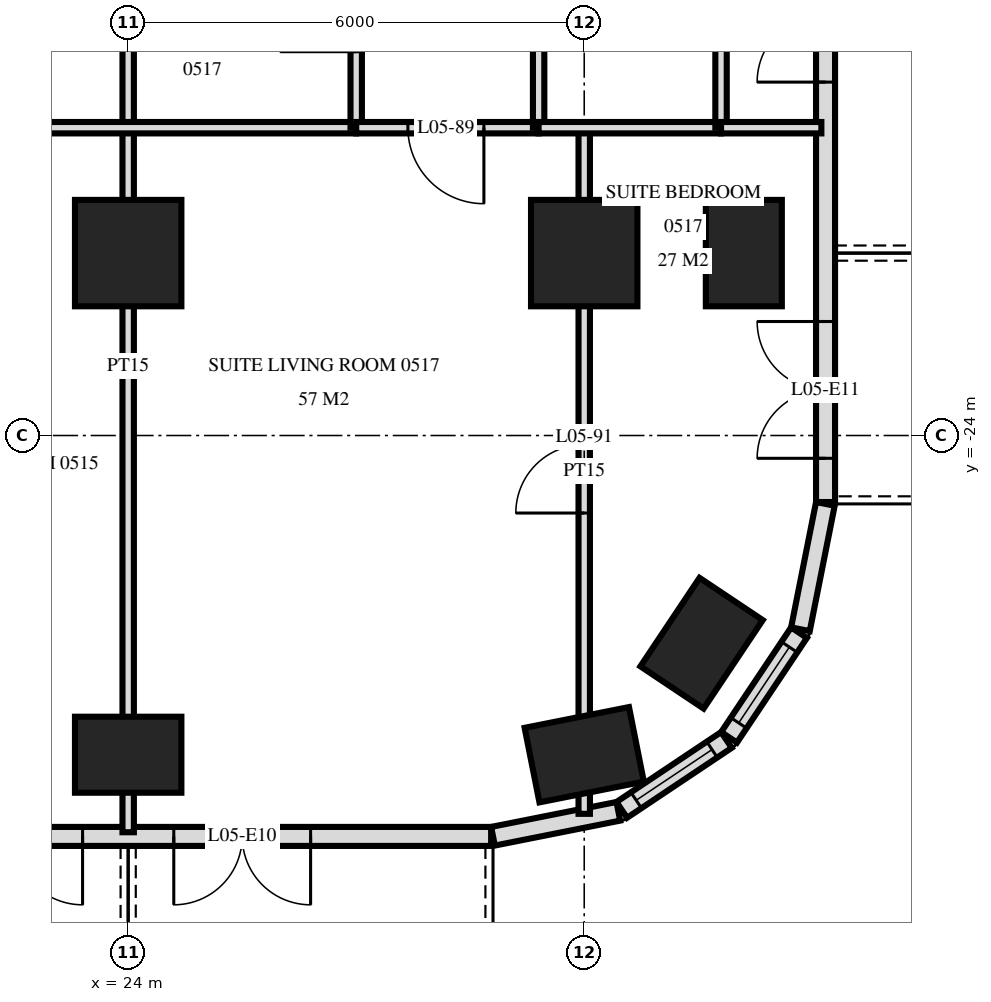
"""IFC4 building model, lengths in metres.
Left out: names, types, materials, properties, quantities, classifications, styles, units other than length and angle.
Written with IfcOpenShell. Run it as: python <this file> out.ifc"""

import sys

from ifc_helpers import new_model, si_unit, direction, frame, frame_2d, origin, origin_2d, place, context, subcontext, project, spatial, rectangle, extrude, element, fill, save


model = new_model("IFC4")
c1 = context("Model", 3, precision=1e-05, world=origin(), true_north=direction((0.0, 1.0)))
c2 = subcontext(c1, "Body", "Model", "MODEL_VIEW")
j1 = project(units=[si_unit("LENGTHUNIT", "METRE"), si_unit("PLANEANGLEUNIT", "RADIAN")], contexts=[c1])
p1 = place(None, origin())
s1 = spatial("IfcSite", under=j1, at=p1, CompositionType="ELEMENT")
p2 = place(p1, origin())
s2 = spatial("IfcBuilding", under=s1, at=p2, CompositionType="ELEMENT")
p3 = place(p2, frame((0.0, 0.0, 27.6)))
s3 = spatial("IfcBuildingStorey", under=s2, at=p3, CompositionType="ELEMENT", Elevation=27.6)
p4 = place(p3, frame((24.0, -28.2, 0.0), z_axis=(0.0, 0.0, 1.0), x_axis=(1.0, 0.0, 0.0)))
e1 = element("IfcColumn", 1, at=p4, inside=s3, PredefinedType="COLUMN", context=c2, shape_type="SweptSolid", body=[
    extrude(rectangle(XDim=1.4, YDim=1.0, at=origin_2d()), origin(), (0.0, 0.0, 1.0), 3.6),
])
p5 = place(p3, frame((24.0, -21.6, 0.0), z_axis=(0.0, 0.0, 1.0), x_axis=(1.0, 0.0, 0.0)))
e2 = element("IfcColumn", 2, at=p5, inside=s3, PredefinedType="COLUMN", context=c2, shape_type="SweptSolid", body=[
    extrude(rectangle(XDim=1.4, YDim=1.4, at=origin_2d()), origin(), (0.0, 0.0, 1.0), 3.6),
])
p6 = place(p3, frame((30.0, -28.2, 0.0), z_axis=(0.0, 0.0, 1.0), x_axis=(0.980792089743, 0.195056086032, 0.0)))
e3 = element("IfcColumn", 3, at=p6, inside=s3, PredefinedType="COLUMN", context=c2, shape_type="SweptSolid", body=[
    extrude(rectangle(XDim=1.4, YDim=1.0, at=origin_2d()), origin(), (0.0, 0.0, 1.0), 3.6),
])
p7 = place(p3, frame((30.0, -21.6, 0.0), z_axis=(0.0, 0.0, 1.0), x_axis=(1.0, 0.0, 0.0)))
e4 = element("IfcColumn", 4, at=p7, inside=s3, PredefinedType="COLUMN", context=c2, shape_type="SweptSolid", body=[
    extrude(rectangle(XDim=1.4, YDim=1.4, at=origin_2d()), origin(), (0.0, 0.0, 1.0), 3.6),
])
for number, where, z_axis, x_axis in (
    (5, (31.544, -26.733, 0.0), (0.0, 0.0, 1.0), (0.556, 0.831, 0.0)),
    (6, (32.1, -21.6, 0.0), (0.0, 0.0, 1.0), (0.0, 1.0, 0.0)),
):
    element("IfcColumn", number, at=place(p3, frame(where, z_axis=z_axis, x_axis=x_axis)), inside=s3, PredefinedType="COLUMN", context=c2, shape_type="SweptSolid", body=[
        extrude(rectangle(XDim=1.4, YDim=1.0, at=origin_2d()), origin(), (0.0, 0.0, 1.0), 3.6),
    ])
p8 = place(p3, frame((-28.775, -29.275, 0.0), z_axis=(0.0, 0.0, 1.0), x_axis=(1.0, 0.0, 0.0)))
e7 = element("IfcWall", 7, at=p8, inside=s3, PredefinedType="SOLIDWALL", context=c2, shape_type="SweptSolid", body=[
    extrude(rectangle(XDim=57.551, YDim=0.25, at=frame_2d((28.775, 0.0))), origin(), (0.0, 0.0, 1.0), 3.32),
])
p9 = place(p8, frame((0.575, 0.0, 0.0)))
e8 = element("IfcOpeningElement", 8, at=p9, cuts=e7, PredefinedType="OPENING", context=c2, shape_type="SweptSolid", body=[
    extrude(rectangle(XDim=1.8, YDim=2.4, at=frame_2d((0.9, 1.2))), frame((0.0, 0.135, 0.0), z_axis=(0.0, -1.0, 0.0), x_axis=(1.0, 0.0, 0.0)), (0.0, 0.0, 1.0), 0.27),
])
p10 = place(p8, frame((5.375, 0.0, 0.0)))
e9 = element("IfcOpeningElement", 9, at=p10, cuts=e7, PredefinedType="OPENING", context=c2, shape_type="SweptSolid", body=[
    extrude(rectangle(XDim=1.8, YDim=2.4, at=frame_2d((0.9, 1.2))), frame((0.0, 0.135, 0.0), z_axis=(0.0, -1.0, 0.0), x_axis=(1.0, 0.0, 0.0)), (0.0, 0.0, 1.0), 0.27),
])
p11 = place(p8, frame((8.075, 0.0, 0.3)))
e10 = element("IfcOpeningElement", 10, at=p11, cuts=e7, PredefinedType="OPENING", context=c2, shape_type="SweptSolid", body=[
    extrude(rectangle(XDim=2.4, YDim=2.1, at=frame_2d((1.2, 1.05))), frame((0.0, 0.135, 0.0), z_axis=(0.0, -1.0, 0.0), x_axis=(1.0, 0.0, 0.0)), (0.0, 0.0, 1.0), 0.27),
])
p12 = place(p8, frame((11.375, 0.0, 0.0)))
e11 = element("IfcOpeningElement", 11, at=p12, cuts=e7, PredefinedType="OPENING", context=c2, shape_type="SweptSolid", body=[
    extrude(rectangle(XDim=1.8, YDim=2.4, at=frame_2d((0.9, 1.2))), frame((0.0, 0.135, 0.0), z_axis=(0.0, -1.0, 0.0), x_axis=(1.0, 0.0, 0.0)), (0.0, 0.0, 1.0), 0.27),
])
p13 = place(p8, frame((14.075, 0.0, 0.3)))
e12 = element("IfcOpeningElement", 12, at=p13, cuts=e7, PredefinedType="OPENING", context=c2, shape_type="SweptSolid", body=[
    extrude(rectangle(XDim=2.4, YDim=2.1, at=frame_2d((1.2, 1.05))), frame((0.0, 0.135, 0.0), z_axis=(0.0, -1.0, 0.0), x_axis=(1.0, 0.0, 0.0)), (0.0, 0.0, 1.0), 0.27),
])
p14 = place(p8, frame((17.375, 0.0, 0.0)))
e13 = element("IfcOpeningElement", 13, at=p14, cuts=e7, PredefinedType="OPENING", context=c2, shape_type="SweptSolid", body=[
    extrude(rectangle(XDim=1.8, YDim=2.4, at=frame_2d((0.9, 1.2))), frame((0.0, 0.135, 0.0), z_axis=(0.0, -1.0, 0.0), x_axis=(1.0, 0.0, 0.0)), (0.0, 0.0, 1.0), 0.27),
])
p15 = place(p8, frame((20.075, 0.0, 0.3)))
e14 = element("IfcOpeningElement", 14, at=p15, cuts=e7, PredefinedType="OPENING", context=c2, shape_type="SweptSolid", body=[
    extrude(rectangle(XDim=2.4, YDim=2.1, at=frame_2d((1.2, 1.05))), frame((0.0, 0.135, 0.0), z_axis=(0.0, -1.0, 0.0), x_axis=(1.0, 0.0, 0.0)), (0.0, 0.0, 1.0), 0.27),
])
p16 = place(p8, frame((23.075, 0.0, 0.3)))
e15 = element("IfcOpeningElement", 15, at=p16, cuts=e7, PredefinedType="OPENING", context=c2, shape_type="SweptSolid", body=[
    extrude(rectangle(XDim=2.4, YDim=2.1, at=frame_2d((1.2, 1.05))), frame((0.0, 0.135, 0.0), z_axis=(0.0, -1.0, 0.0), x_axis=(1.0, 0.0, 0.0)), (0.0, 0.0, 1.0), 0.27),
])
p17 = place(p8, frame((26.375, 0.0, 0.0)))
e16 = element("IfcOpeningElement", 16, at=p17, cuts=e7, PredefinedType="OPENING", context=c2, shape_type="SweptSolid", body=[
    extrude(rectangle(XDim=1.8, YDim=2.4, at=frame_2d((0.9, 1.2))), frame((0.0, 0.135, 0.0), z_axis=(0.0, -1.0, 0.0), x_axis=(1.0, 0.0, 0.0)), (0.0, 0.0, 1.0), 0.27),
])
p18 = place(p8, frame((29.375, 0.0, 0.0)))
e17 = element("IfcOpeningElement", 17, at=p18, cuts=e7, PredefinedType="OPENING", context=c2, shape_type="SweptSolid", body=[
    extrude(rectangle(XDim=1.8, YDim=2.4, at=frame_2d((0.9, 1.2))), frame((0.0, 0.135, 0.0), z_axis=(0.0, -1.0, 0.0), x_axis=(1.0, 0.0, 0.0)), (0.0, 0.0, 1.0), 0.27),
])
p19 = place(p8, frame((32.075, 0.0, 0.3)))
e18 = element("IfcOpeningElement", 18, at=p19, cuts=e7, PredefinedType="OPENING", context=c2, shape_type="SweptSolid", body=[
    extrude(rectangle(XDim=2.4, YDim=2.1, at=frame_2d((1.2, 1.05))), frame((0.0, 0.135, 0.0), z_axis=(0.0, -1.0, 0.0), x_axis=(1.0, 0.0, 0.0)), (0.0, 0.0, 1.0), 0.27),
])
p20 = place(p8, frame((35.375, 0.0, 0.0)))
e19 = element("IfcOpeningElement", 19, at=p20, cuts=e7, PredefinedType="OPENING", context=c2, shape_type="SweptSolid", body=[
    extrude(rectangle(XDim=1.8, YDim=2.4, at=frame_2d((0.9, 1.2))), frame((0.0, 0.135, 0.0), z_axis=(0.0, -1.0, 0.0), x_axis=(1.0, 0.0, 0.0)), (0.0, 0.0, 1.0), 0.27),
])
p21 = place(p8, frame((38.075, 0.0, 0.3)))
e20 = element("IfcOpeningElement", 20, at=p21, cuts=e7, PredefinedType="OPENING", context=c2, shape_type="SweptSolid", body=[
    extrude(rectangle(XDim=2.4, YDim=2.1, at=frame_2d((1.2, 1.05))), frame((0.0, 0.135, 0.0), z_axis=(0.0, -1.0, 0.0), x_axis=(1.0, 0.0, 0.0)), (0.0, 0.0, 1.0), 0.27),
])
p22 = place(p8, frame((41.375, 0.0, 0.0)))
e21 = element("IfcOpeningElement", 21, at=p22, cuts=e7, PredefinedType="OPENING", context=c2, shape_type="SweptSolid", body=[
    extrude(rectangle(XDim=1.8, YDim=2.4, at=frame_2d((0.9, 1.2))), frame((0.0, 0.135, 0.0), z_axis=(0.0, -1.0, 0.0), x_axis=(1.0, 0.0, 0.0)), (0.0, 0.0, 1.0), 0.27),
])
p23 = place(p8, frame((44.075, 0.0, 0.3)))
e22 = element("IfcOpeningElement", 22, at=p23, cuts=e7, PredefinedType="OPENING", context=c2, shape_type="SweptSolid", body=[
    extrude(rectangle(XDim=2.4, YDim=2.1, at=frame_2d((1.2, 1.05))), frame((0.0, 0.135, 0.0), z_axis=(0.0, -1.0, 0.0), x_axis=(1.0, 0.0, 0.0)), (0.0, 0.0, 1.0), 0.27),
])
p24 = place(p8, frame((47.075, 0.0, 0.3)))
e23 = element("IfcOpeningElement", 23, at=p24, cuts=e7, PredefinedType="OPENING", context=c2, shape_type="SweptSolid", body=[
    extrude(rectangle(XDim=2.4, YDim=2.1, at=frame_2d((1.2, 1.05))), frame((0.0, 0.135, 0.0), z_axis=(0.0, -1.0, 0.0), x_axis=(1.0, 0.0, 0.0)), (0.0, 0.0, 1.0), 0.27),
])
p25 = place(p8, frame((50.375, 0.0, 0.0)))
e24 = element("IfcOpeningElement", 24, at=p25, cuts=e7, PredefinedType="OPENING", context=c2, shape_type="SweptSolid", body=[
    extrude(rectangle(XDim=1.8, YDim=2.4, at=frame_2d((0.9, 1.2))), frame((0.0, 0.135, 0.0), z_axis=(0.0, -1.0, 0.0), x_axis=(1.0, 0.0, 0.0)), (0.0, 0.0, 1.0), 0.27),
])
p26 = place(p8, frame((53.375, 0.0, 0.0)))
e25 = element("IfcOpeningElement", 25, at=p26, cuts=e7, PredefinedType="OPENING", context=c2, shape_type="SweptSolid", body=[
    extrude(rectangle(XDim=1.8, YDim=2.4, at=frame_2d((0.9, 1.2))), frame((0.0, 0.135, 0.0), z_axis=(0.0, -1.0, 0.0), x_axis=(1.0, 0.0, 0.0)), (0.0, 0.0, 1.0), 0.27),
])
p27 = place(p3, frame((28.8, -29.273, 0.0), z_axis=(0.0, 0.0, 1.0), x_axis=(0.980775640221, 0.19513878023, 0.0)))
e26 = element("IfcWall", 26, at=p27, inside=s3, PredefinedType="SOLIDWALL", context=c2, shape_type="SweptSolid", body=[
    extrude(rectangle(XDim=1.681, YDim=0.25, at=frame_2d((0.841, 0.0))), origin(), (0.0, 0.0, 1.0), 3.32),
])
p28 = place(p3, frame((30.494, -28.926, 0.0), z_axis=(0.0, 0.0, 1.0), x_axis=(0.831482937015, 0.55555029066, 0.0)))
e27 = element("IfcWall", 27, at=p28, inside=s3, PredefinedType="SOLIDWALL", context=c2, shape_type="SweptSolid", body=[
    extrude(rectangle(XDim=1.656, YDim=0.25, at=frame_2d((0.828, 0.0))), origin(), (0.0, 0.0, 1.0), 3.32),
])
p29 = place(p28, frame((0.228, 0.0, 0.9)))
e28 = element("IfcOpeningElement", 28, at=p29, cuts=e27, PredefinedType="OPENING", context=c2, shape_type="SweptSolid", body=[
    extrude(rectangle(XDim=1.2, YDim=1.5, at=frame_2d((0.6, 0.75))), frame((0.0, 0.135, 0.0), z_axis=(0.0, -1.0, 0.0), x_axis=(1.0, 0.0, 0.0)), (0.0, 0.0, 1.0), 0.27),
])
p30 = place(p3, frame((31.906, -27.971, 0.0), z_axis=(0.0, 0.0, 1.0), x_axis=(0.55555029066, 0.831482937015, 0.0)))
e29 = element("IfcWall", 29, at=p30, inside=s3, PredefinedType="SOLIDWALL", context=c2, shape_type="SweptSolid", body=[
    extrude(rectangle(XDim=1.656, YDim=0.25, at=frame_2d((0.828, 0.0))), origin(), (0.0, 0.0, 1.0), 3.32),
])
p31 = place(p30, frame((0.228, 0.0, 0.9)))
e30 = element("IfcOpeningElement", 30, at=p31, cuts=e29, PredefinedType="OPENING", context=c2, shape_type="SweptSolid", body=[
    extrude(rectangle(XDim=1.2, YDim=1.5, at=frame_2d((0.6, 0.75))), frame((0.0, 0.135, 0.0), z_axis=(0.0, -1.0, 0.0), x_axis=(1.0, 0.0, 0.0)), (0.0, 0.0, 1.0), 0.27),
])
p32 = place(p3, frame((32.844, -26.549, 0.0), z_axis=(0.0, 0.0, 1.0), x_axis=(0.195166572128, 0.980770110232, 0.0)))
e31 = element("IfcWall", 31, at=p32, inside=s3, PredefinedType="SOLIDWALL", context=c2, shape_type="SweptSolid", body=[
    extrude(rectangle(XDim=1.681, YDim=0.25, at=frame_2d((0.841, 0.0))), origin(), (0.0, 0.0, 1.0), 3.32),
])
p33 = place(p3, frame((33.175, -24.875, 0.0), z_axis=(0.0, 0.0, 1.0), x_axis=(0.0, 1.0, 0.0)))
e32 = element("IfcWall", 32, at=p33, inside=s3, PredefinedType="SOLIDWALL", context=c2, shape_type="SweptSolid", body=[
    extrude(rectangle(XDim=21.551, YDim=0.25, at=frame_2d((10.775, 0.0))), origin(), (0.0, 0.0, 1.0), 3.32),
])
p34 = place(p33, frame((0.575, 0.0, 0.0)))
e33 = element("IfcOpeningElement", 33, at=p34, cuts=e32, PredefinedType="OPENING", context=c2, shape_type="SweptSolid", body=[
    extrude(rectangle(XDim=1.8, YDim=2.4, at=frame_2d((0.9, 1.2))), frame((0.0, 0.135, 0.0), z_axis=(0.0, -1.0, 0.0), x_axis=(1.0, 0.0, 0.0)), (0.0, 0.0, 1.0), 0.27),
])
p35 = place(p33, frame((5.525, 0.0, 0.0)))
e34 = element("IfcOpeningElement", 34, at=p35, cuts=e32, PredefinedType="OPENING", context=c2, shape_type="SweptSolid", body=[
    extrude(rectangle(XDim=1.8, YDim=2.4, at=frame_2d((0.9, 1.2))), frame((0.0, 0.135, 0.0), z_axis=(0.0, -1.0, 0.0), x_axis=(1.0, 0.0, 0.0)), (0.0, 0.0, 1.0), 0.27),
])
p36 = place(p33, frame((12.725, 0.0, 0.0)))
e35 = element("IfcOpeningElement", 35, at=p36, cuts=e32, PredefinedType="OPENING", context=c2, shape_type="SweptSolid", body=[
    extrude(rectangle(XDim=1.8, YDim=2.4, at=frame_2d((0.9, 1.2))), frame((0.0, 0.135, 0.0), z_axis=(0.0, -1.0, 0.0), x_axis=(1.0, 0.0, 0.0)), (0.0, 0.0, 1.0), 0.27),
])
p37 = place(p3, frame((31.8, -19.95, 0.0), z_axis=(0.0, 0.0, 1.0), x_axis=(0.0, 1.0, 0.0)))
e36 = element("IfcWall", 36, at=p37, inside=s3, PredefinedType="PLUMBINGWALL", context=c2, shape_type="SweptSolid", body=[
    extrude(rectangle(XDim=3.0, YDim=0.15, at=frame_2d((1.5, 0.0))), origin(), (0.0, 0.0, 1.0), 3.32),
])
p38 = place(p37, frame((1.12, 0.0, 0.0)))
e37 = element("IfcOpeningElement", 37, at=p38, cuts=e36, PredefinedType="OPENING", context=c2, shape_type="SweptSolid", body=[
    extrude(rectangle(XDim=0.8, YDim=2.1, at=frame_2d((0.4, 1.05))), frame((0.0, 0.085, 0.0), z_axis=(0.0, -1.0, 0.0), x_axis=(1.0, 0.0, 0.0)), (0.0, 0.0, 1.0), 0.17),
])
p39 = place(p3, frame((30.0, -28.978, 0.0), z_axis=(0.0, 0.0, 1.0), x_axis=(0.0, 1.0, 0.0)))
e38 = element("IfcWall", 38, at=p39, inside=s3, PredefinedType="PARTITIONING", context=c2, shape_type="SweptSolid", body=[
    extrude(rectangle(XDim=9.028, YDim=0.15, at=frame_2d((4.514, 0.0))), origin(), (0.0, 0.0, 1.0), 3.32),
])
p40 = place(p39, frame((3.958, 0.0, 0.0)))
e39 = element("IfcOpeningElement", 39, at=p40, cuts=e38, PredefinedType="OPENING", context=c2, shape_type="SweptSolid", body=[
    extrude(rectangle(XDim=0.9, YDim=2.1, at=frame_2d((0.45, 1.05))), frame((0.0, 0.085, 0.0), z_axis=(0.0, -1.0, 0.0), x_axis=(1.0, 0.0, 0.0)), (0.0, 0.0, 1.0), 0.17),
])
p41 = place(p3, frame((29.4, -19.95, 0.0), z_axis=(0.0, 0.0, 1.0), x_axis=(0.0, 1.0, 0.0)))
e40 = element("IfcWall", 40, at=p41, inside=s3, PredefinedType="PARTITIONING", context=c2, shape_type="SweptSolid", body=[
    extrude(rectangle(XDim=3.0, YDim=0.15, at=frame_2d((1.5, 0.0))), origin(), (0.0, 0.0, 1.0), 3.32),
])
p42 = place(p41, frame((1.02, 0.0, 0.0)))
e41 = element("IfcOpeningElement", 41, at=p42, cuts=e40, PredefinedType="OPENING", context=c2, shape_type="SweptSolid", body=[
    extrude(rectangle(XDim=1.0, YDim=2.1, at=frame_2d((0.5, 1.05))), frame((0.0, 0.085, 0.0), z_axis=(0.0, -1.0, 0.0), x_axis=(1.0, 0.0, 0.0)), (0.0, 0.0, 1.0), 0.17),
])
p43 = place(p3, frame((27.0, -19.95, 0.0), z_axis=(0.0, 0.0, 1.0), x_axis=(0.0, 1.0, 0.0)))
e42 = element("IfcWall", 42, at=p43, inside=s3, PredefinedType="PARTITIONING", context=c2, shape_type="SweptSolid", body=[
    extrude(rectangle(XDim=3.0, YDim=0.15, at=frame_2d((1.5, 0.0))), origin(), (0.0, 0.0, 1.0), 3.32),
])
p44 = place(p43, frame((1.0, 0.0, 0.0)))
e43 = element("IfcOpeningElement", 43, at=p44, cuts=e42, PredefinedType="OPENING", context=c2, shape_type="SweptSolid", body=[
    extrude(rectangle(XDim=1.0, YDim=2.1, at=frame_2d((0.5, 1.05))), frame((0.0, 0.085, 0.0), z_axis=(0.0, -1.0, 0.0), x_axis=(1.0, 0.0, 0.0)), (0.0, 0.0, 1.0), 0.17),
])
p45 = place(p3, frame((24.0, -29.22, 0.0), z_axis=(0.0, 0.0, 1.0), x_axis=(0.0, 1.0, 0.0)))
e44 = element("IfcWall", 44, at=p45, inside=s3, PredefinedType="PARTITIONING", context=c2, shape_type="SweptSolid", body=[
    extrude(rectangle(XDim=12.27, YDim=0.15, at=frame_2d((6.135, 0.0))), origin(), (0.0, 0.0, 1.0), 3.32),
])
p46 = place(p3, frame((27.0, -19.95, 0.0), z_axis=(0.0, 0.0, 1.0), x_axis=(1.0, 0.0, 0.0)))
e45 = element("IfcWall", 45, at=p46, inside=s3, PredefinedType="PARTITIONING", context=c2, shape_type="SweptSolid", body=[
    extrude(rectangle(XDim=2.4, YDim=0.15, at=frame_2d((1.2, 0.0))), origin(), (0.0, 0.0, 1.0), 3.32),
])
p47 = place(p46, frame((0.68, 0.0, 0.0)))
e46 = element("IfcOpeningElement", 46, at=p47, cuts=e45, PredefinedType="OPENING", context=c2, shape_type="SweptSolid", body=[
    extrude(rectangle(XDim=1.0, YDim=2.1, at=frame_2d((0.5, 1.05))), frame((0.0, 0.085, 0.0), z_axis=(0.0, -1.0, 0.0), x_axis=(1.0, 0.0, 0.0)), (0.0, 0.0, 1.0), 0.17),
])
p48 = place(p3, frame((22.3, -19.95, 0.0), z_axis=(0.0, 0.0, 1.0), x_axis=(1.0, 0.0, 0.0)))
e47 = element("IfcWall", 47, at=p48, inside=s3, PredefinedType="PARTITIONING", context=c2, shape_type="SweptSolid", body=[
    extrude(rectangle(XDim=4.7, YDim=0.15, at=frame_2d((2.35, 0.0))), origin(), (0.0, 0.0, 1.0), 3.32),
])
p49 = place(p3, frame((29.4, -19.95, 0.0), z_axis=(0.0, 0.0, 1.0), x_axis=(1.0, 0.0, 0.0)))
e48 = element("IfcWall", 48, at=p49, inside=s3, PredefinedType="PARTITIONING", context=c2, shape_type="SweptSolid", body=[
    extrude(rectangle(XDim=2.4, YDim=0.15, at=frame_2d((1.2, 0.0))), origin(), (0.0, 0.0, 1.0), 3.32),
])
p50 = place(p3, frame((31.8, -19.95, 0.0), z_axis=(0.0, 0.0, 1.0), x_axis=(1.0, 0.0, 0.0)))
e49 = element("IfcWall", 49, at=p50, inside=s3, PredefinedType="PLUMBINGWALL", context=c2, shape_type="SweptSolid", body=[
    extrude(rectangle(XDim=1.32, YDim=0.15, at=frame_2d((0.66, 0.0))), origin(), (0.0, 0.0, 1.0), 3.32),
])
p51 = place(p29, origin())
e50 = element("IfcWindow", 50, at=p51, inside=s3, PartitioningType="SINGLE_PANEL", PredefinedType="WINDOW", context=c2, shape_type="SweptSolid", body=[
    extrude(rectangle(XDim=1.2, YDim=1.5, at=frame_2d((0.6, 0.75))), frame((0.0, 0.03, 0.0), z_axis=(0.0, -1.0, 0.0), x_axis=(1.0, 0.0, 0.0)), (0.0, 0.0, 1.0), 0.06),
])
fill(e28, e50)
p52 = place(p31, origin())
e51 = element("IfcWindow", 51, at=p52, inside=s3, PartitioningType="SINGLE_PANEL", PredefinedType="WINDOW", context=c2, shape_type="SweptSolid", body=[
    extrude(rectangle(XDim=1.2, YDim=1.5, at=frame_2d((0.6, 0.75))), frame((0.0, 0.03, 0.0), z_axis=(0.0, -1.0, 0.0), x_axis=(1.0, 0.0, 0.0)), (0.0, 0.0, 1.0), 0.06),
])
fill(e30, e51)
p53 = place(p25, frame((0.9, 0.0, 0.0), z_axis=(0.0, 0.0, 1.0), x_axis=(-1.0, 0.0, 0.0)))
e52 = element("IfcDoor", 52, at=p53, inside=s3, OperationType="DOUBLE_DOOR_SINGLE_SWING", PredefinedType="DOOR", context=c2, shape_type="SweptSolid", body=[
    extrude(rectangle(XDim=1.8, YDim=2.4, at=frame_2d((0.0, 1.2))), frame((0.0, -0.025, 0.0), z_axis=(0.0, 1.0, 0.0), x_axis=(-1.0, 0.0, 0.0)), (0.0, 0.0, 1.0), 0.05),
])
fill(e24, e52)
p54 = place(p26, frame((0.9, 0.0, 0.0), z_axis=(0.0, 0.0, 1.0), x_axis=(-1.0, 0.0, 0.0)))
e53 = element("IfcDoor", 53, at=p54, inside=s3, OperationType="DOUBLE_DOOR_SINGLE_SWING", PredefinedType="DOOR", context=c2, shape_type="SweptSolid", body=[
    extrude(rectangle(XDim=1.8, YDim=2.4, at=frame_2d((0.0, 1.2))), frame((0.0, -0.025, 0.0), z_axis=(0.0, 1.0, 0.0), x_axis=(-1.0, 0.0, 0.0)), (0.0, 0.0, 1.0), 0.05),
])
fill(e25, e53)
p55 = place(p34, origin())
e54 = element("IfcDoor", 54, at=p55, inside=s3, OperationType="DOUBLE_DOOR_SINGLE_SWING", PredefinedType="DOOR", context=c2, shape_type="SweptSolid", body=[
    extrude(rectangle(XDim=1.8, YDim=2.4, at=frame_2d((0.9, 1.2))), frame((0.0, 0.025, 0.0), z_axis=(0.0, -1.0, 0.0), x_axis=(1.0, 0.0, 0.0)), (0.0, 0.0, 1.0), 0.05),
])
fill(e33, e54)
p56 = place(p35, origin())
e55 = element("IfcDoor", 55, at=p56, inside=s3, OperationType="DOUBLE_DOOR_SINGLE_SWING", PredefinedType="DOOR", context=c2, shape_type="SweptSolid", body=[
    extrude(rectangle(XDim=1.8, YDim=2.4, at=frame_2d((0.9, 1.2))), frame((0.0, 0.025, 0.0), z_axis=(0.0, -1.0, 0.0), x_axis=(1.0, 0.0, 0.0)), (0.0, 0.0, 1.0), 0.05),
])
fill(e34, e55)
p57 = place(p47, frame((0.5, 0.0, 0.0), z_axis=(0.0, 0.0, 1.0), x_axis=(-1.0, 0.0, 0.0)))
e56 = element("IfcDoor", 56, at=p57, inside=s3, OperationType="SINGLE_SWING_RIGHT", PredefinedType="DOOR", context=c2, shape_type="SweptSolid", body=[
    extrude(rectangle(XDim=1.0, YDim=2.1, at=frame_2d((0.0, 1.05))), frame((0.0, -0.025, 0.0), z_axis=(0.0, 1.0, 0.0), x_axis=(-1.0, 0.0, 0.0)), (0.0, 0.0, 1.0), 0.05),
])
fill(e46, e56)
p58 = place(p40, origin())
e57 = element("IfcDoor", 57, at=p58, inside=s3, OperationType="SINGLE_SWING_RIGHT", PredefinedType="DOOR", context=c2, shape_type="SweptSolid", body=[
    extrude(rectangle(XDim=0.9, YDim=2.1, at=frame_2d((0.45, 1.05))), frame((0.0, 0.025, 0.0), z_axis=(0.0, -1.0, 0.0), x_axis=(1.0, 0.0, 0.0)), (0.0, 0.0, 1.0), 0.05),
])
fill(e39, e57)
save(model, sys.argv[1])
